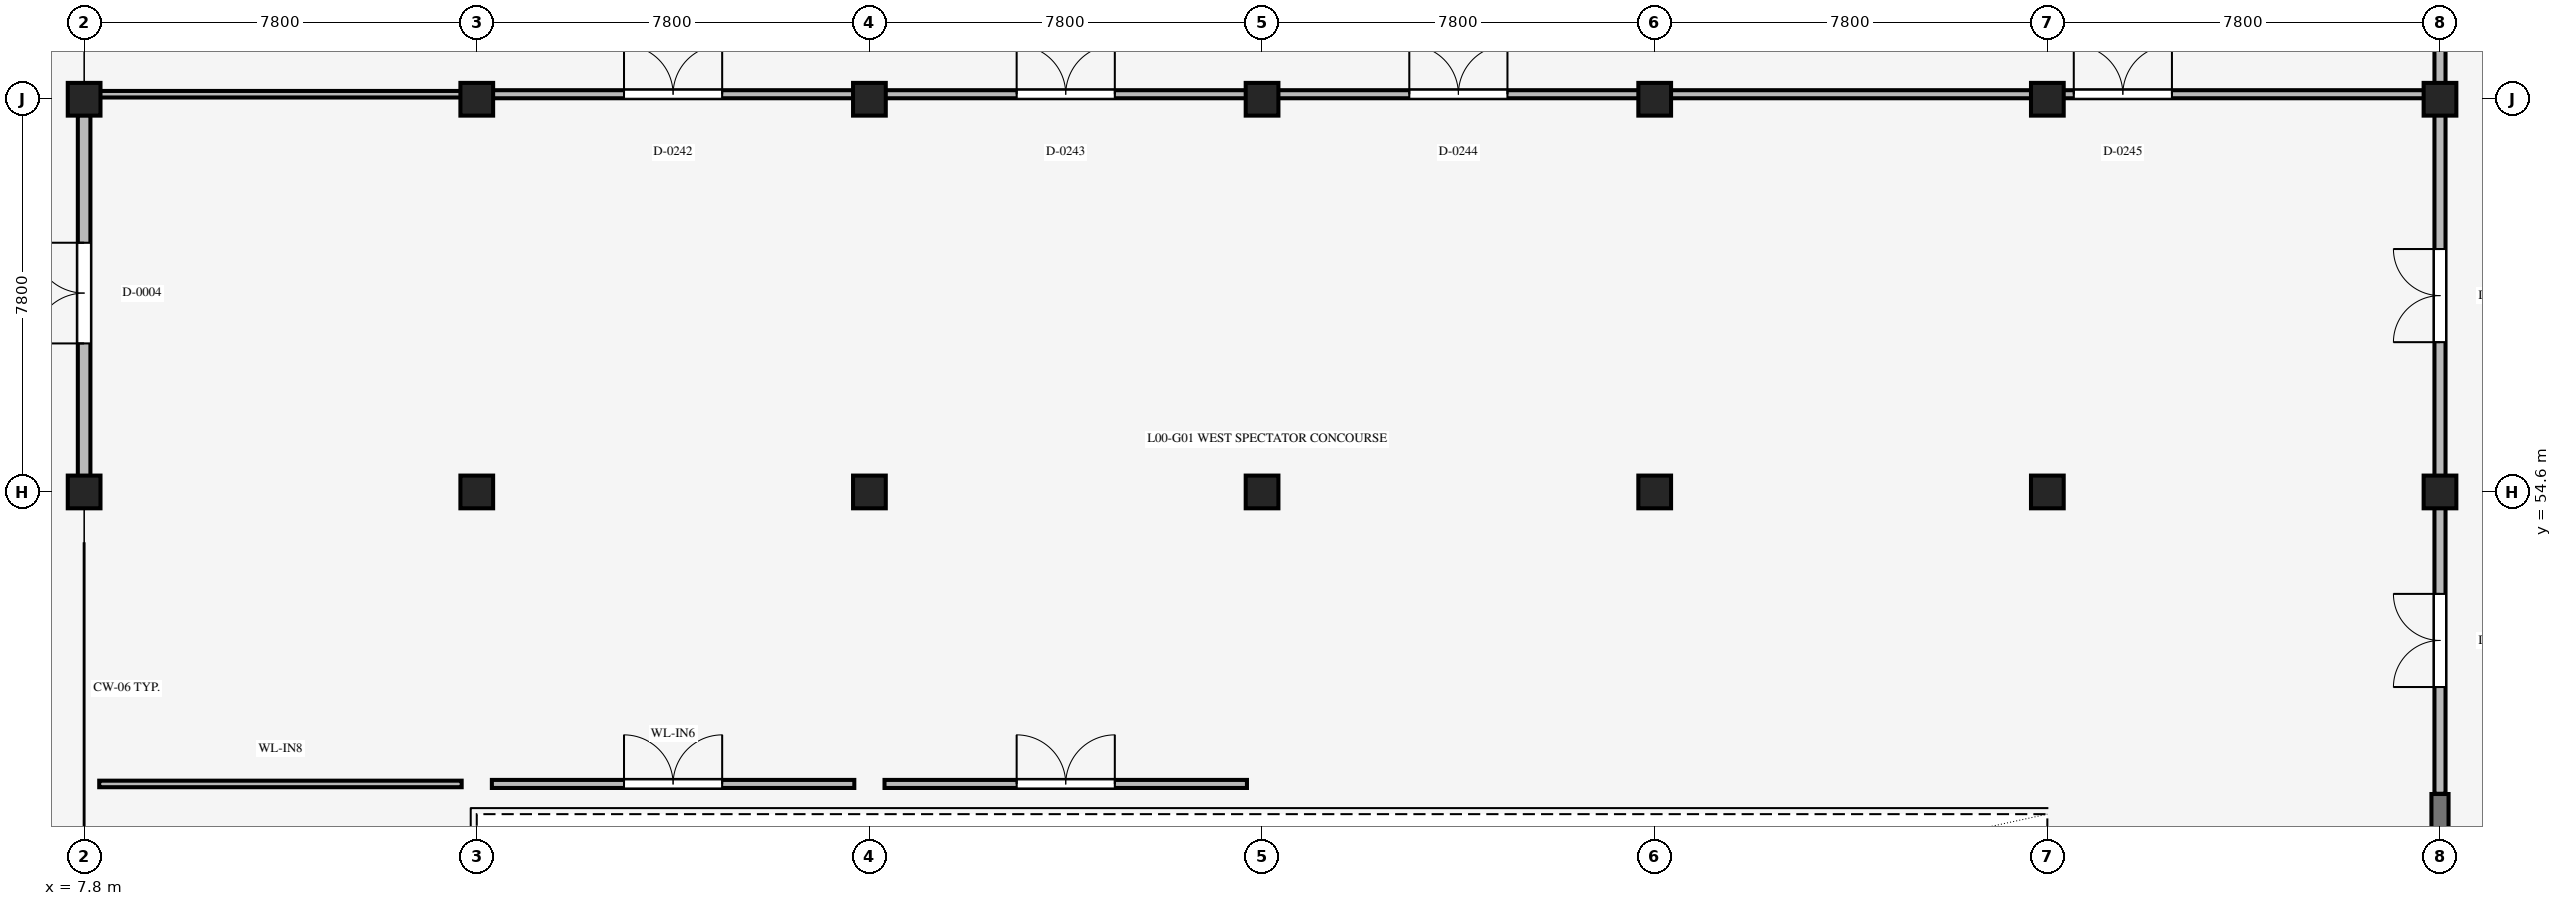
"""IFC4 building model, lengths in metres.
Left out: names, types, materials, properties, quantities, classifications, styles, units other than length and angle.
Written with IfcOpenShell. Run it as: python <this file> out.ifc"""

import sys

from ifc_helpers import new_model, si_unit, direction, frame, frame_2d, origin, origin_2d, place, context, subcontext, project, spatial, rectangle, extrude, element, fill, save


model = new_model("IFC4")
c1 = context("Model", 3, precision=1e-05, world=origin(), true_north=direction((0.0, 1.0)))
c2 = subcontext(c1, "Body", "Model", "MODEL_VIEW")
j1 = project(units=[si_unit("LENGTHUNIT", "METRE"), si_unit("PLANEANGLEUNIT", "RADIAN")], contexts=[c1])
p1 = place(None, origin())
s1 = spatial("IfcSite", under=j1, at=p1, CompositionType="ELEMENT")
p2 = place(p1, origin())
s2 = spatial("IfcBuilding", under=s1, at=p2, CompositionType="ELEMENT")
p3 = place(p2, origin())
s3 = spatial("IfcBuildingStorey", under=s2, at=p3, CompositionType="ELEMENT", Elevation=0.0)
for number, where, z_axis, x_axis in (
    (1, (7.8, 54.6, 0.0), (0.0, 0.0, 1.0), (1.0, 0.0, 0.0)),
    (2, (7.8, 62.4, 0.0), (0.0, 0.0, 1.0), (1.0, 0.0, 0.0)),
    (3, (15.6, 54.6, 0.0), (0.0, 0.0, 1.0), (1.0, 0.0, 0.0)),
    (4, (15.6, 62.4, 0.0), (0.0, 0.0, 1.0), (1.0, 0.0, 0.0)),
    (5, (23.4, 54.6, 0.0), (0.0, 0.0, 1.0), (1.0, 0.0, 0.0)),
    (6, (23.4, 62.4, 0.0), (0.0, 0.0, 1.0), (1.0, 0.0, 0.0)),
    (7, (31.2, 54.6, 0.0), (0.0, 0.0, 1.0), (1.0, 0.0, 0.0)),
    (8, (31.2, 62.4, 0.0), (0.0, 0.0, 1.0), (1.0, 0.0, 0.0)),
    (9, (39.0, 54.6, 0.0), (0.0, 0.0, 1.0), (1.0, 0.0, 0.0)),
    (10, (39.0, 62.4, 0.0), (0.0, 0.0, 1.0), (1.0, 0.0, 0.0)),
    (11, (46.8, 54.6, 0.0), (0.0, 0.0, 1.0), (1.0, 0.0, 0.0)),
    (12, (46.8, 62.4, 0.0), (0.0, 0.0, 1.0), (1.0, 0.0, 0.0)),
    (13, (54.6, 54.6, 0.0), (0.0, 0.0, 1.0), (1.0, 0.0, 0.0)),
    (14, (54.6, 62.4, 0.0), (0.0, 0.0, 1.0), (1.0, 0.0, 0.0)),
):
    element("IfcColumn", number, at=place(p3, frame(where, z_axis=z_axis, x_axis=x_axis)), inside=s3, PredefinedType="COLUMN", context=c2, shape_type="SweptSolid", body=[
        extrude(rectangle(XDim=0.65, YDim=0.65, at=origin_2d()), origin(), (0.0, 0.0, 1.0), 6.0),
    ])
p4 = place(p3, frame((7.8, 54.915, 0.0), z_axis=(0.0, 0.0, 1.0), x_axis=(0.0, 1.0, 0.0)))
e15 = element("IfcWall", 15, at=p4, inside=s3, PredefinedType="STANDARD", context=c2, shape_type="SweptSolid", body=[
    extrude(rectangle(XDim=7.17, YDim=0.25, at=frame_2d((3.585, 0.0))), origin(), (0.0, 0.0, 1.0), 4.691),
])
p5 = place(p4, frame((2.635, 0.0, 0.0)))
e16 = element("IfcOpeningElement", 16, at=p5, cuts=e15, PredefinedType="OPENING", context=c2, shape_type="SweptSolid", body=[
    extrude(rectangle(XDim=2.0, YDim=2.4, at=frame_2d((1.0, 1.2))), frame((0.0, 0.135, 0.0), z_axis=(0.0, -1.0, 0.0), x_axis=(1.0, 0.0, 0.0)), (0.0, 0.0, 1.0), 0.27),
])
p6 = place(p3, frame((54.6, 40.75, 0.0), z_axis=(0.0, 0.0, 1.0), x_axis=(0.0, 1.0, 0.0)))
e17 = element("IfcWall", 17, at=p6, inside=s3, PredefinedType="STANDARD", context=c2, shape_type="SweptSolid", body=[
    extrude(rectangle(XDim=7.85, YDim=0.34, at=frame_2d((3.925, 0.0))), origin(), (0.0, 0.0, 1.0), 4.9),
])
p7 = place(p6, frame((0.95, 0.0, 0.0)))
e18 = element("IfcOpeningElement", 18, at=p7, cuts=e17, PredefinedType="OPENING", context=c2, shape_type="SweptSolid", body=[
    extrude(rectangle(XDim=6.2, YDim=3.2, at=frame_2d((3.1, 1.6))), frame((0.0, 0.18, 0.0), z_axis=(0.0, -1.0, 0.0), x_axis=(1.0, 0.0, 0.0)), (0.0, 0.0, 1.0), 0.36),
])
p8 = place(p3, frame((8.1, 48.8, 0.0), z_axis=(0.0, 0.0, 1.0), x_axis=(1.0, 0.0, 0.0)))
e19 = element("IfcWall", 19, at=p8, inside=s3, PredefinedType="STANDARD", context=c2, shape_type="SweptSolid", body=[
    extrude(rectangle(XDim=7.2, YDim=0.13, at=frame_2d((3.6, 0.0))), origin(), (0.0, 0.0, 1.0), 3.05),
])
p9 = place(p3, frame((15.9, 48.8, 0.0), z_axis=(0.0, 0.0, 1.0), x_axis=(1.0, 0.0, 0.0)))
e20 = element("IfcWall", 20, at=p9, inside=s3, PredefinedType="STANDARD", context=c2, shape_type="SweptSolid", body=[
    extrude(rectangle(XDim=7.2, YDim=0.16, at=frame_2d((3.6, 0.0))), origin(), (0.0, 0.0, 1.0), 3.05),
])
p10 = place(p9, frame((2.625, 0.0, 0.0)))
e21 = element("IfcOpeningElement", 21, at=p10, cuts=e20, PredefinedType="OPENING", context=c2, shape_type="SweptSolid", body=[
    extrude(rectangle(XDim=1.95, YDim=2.35, at=frame_2d((0.975, 1.175))), frame((0.0, 0.09, 0.0), z_axis=(0.0, -1.0, 0.0), x_axis=(1.0, 0.0, 0.0)), (0.0, 0.0, 1.0), 0.18),
])
p11 = place(p3, frame((23.7, 48.8, 0.0), z_axis=(0.0, 0.0, 1.0), x_axis=(1.0, 0.0, 0.0)))
e22 = element("IfcWall", 22, at=p11, inside=s3, PredefinedType="STANDARD", context=c2, shape_type="SweptSolid", body=[
    extrude(rectangle(XDim=7.2, YDim=0.16, at=frame_2d((3.6, 0.0))), origin(), (0.0, 0.0, 1.0), 3.05),
])
p12 = place(p11, frame((2.625, 0.0, 0.0)))
e23 = element("IfcOpeningElement", 23, at=p12, cuts=e22, PredefinedType="OPENING", context=c2, shape_type="SweptSolid", body=[
    extrude(rectangle(XDim=1.95, YDim=2.35, at=frame_2d((0.975, 1.175))), frame((0.0, 0.09, 0.0), z_axis=(0.0, -1.0, 0.0), x_axis=(1.0, 0.0, 0.0)), (0.0, 0.0, 1.0), 0.18),
])
p13 = place(p3, frame((8.1, 62.5, 0.0), z_axis=(0.0, 0.0, 1.0), x_axis=(1.0, 0.0, 0.0)))
e24 = element("IfcWall", 24, at=p13, inside=s3, PredefinedType="STANDARD", context=c2, shape_type="SweptSolid", body=[
    extrude(rectangle(XDim=7.2, YDim=0.13, at=frame_2d((3.6, 0.0))), origin(), (0.0, 0.0, 1.0), 3.05),
])
p14 = place(p3, frame((15.9, 62.5, 0.0), z_axis=(0.0, 0.0, 1.0), x_axis=(1.0, 0.0, 0.0)))
e25 = element("IfcWall", 25, at=p14, inside=s3, PredefinedType="STANDARD", context=c2, shape_type="SweptSolid", body=[
    extrude(rectangle(XDim=7.2, YDim=0.16, at=frame_2d((3.6, 0.0))), origin(), (0.0, 0.0, 1.0), 3.05),
])
p15 = place(p14, frame((2.625, 0.0, 0.0)))
e26 = element("IfcOpeningElement", 26, at=p15, cuts=e25, PredefinedType="OPENING", context=c2, shape_type="SweptSolid", body=[
    extrude(rectangle(XDim=1.95, YDim=2.35, at=frame_2d((0.975, 1.175))), frame((0.0, 0.09, 0.0), z_axis=(0.0, -1.0, 0.0), x_axis=(1.0, 0.0, 0.0)), (0.0, 0.0, 1.0), 0.18),
])
p16 = place(p3, frame((23.7, 62.5, 0.0), z_axis=(0.0, 0.0, 1.0), x_axis=(1.0, 0.0, 0.0)))
e27 = element("IfcWall", 27, at=p16, inside=s3, PredefinedType="STANDARD", context=c2, shape_type="SweptSolid", body=[
    extrude(rectangle(XDim=7.2, YDim=0.16, at=frame_2d((3.6, 0.0))), origin(), (0.0, 0.0, 1.0), 3.05),
])
p17 = place(p16, frame((2.625, 0.0, 0.0)))
e28 = element("IfcOpeningElement", 28, at=p17, cuts=e27, PredefinedType="OPENING", context=c2, shape_type="SweptSolid", body=[
    extrude(rectangle(XDim=1.95, YDim=2.35, at=frame_2d((0.975, 1.175))), frame((0.0, 0.09, 0.0), z_axis=(0.0, -1.0, 0.0), x_axis=(1.0, 0.0, 0.0)), (0.0, 0.0, 1.0), 0.18),
])
p18 = place(p3, frame((31.5, 62.5, 0.0), z_axis=(0.0, 0.0, 1.0), x_axis=(1.0, 0.0, 0.0)))
e29 = element("IfcWall", 29, at=p18, inside=s3, PredefinedType="STANDARD", context=c2, shape_type="SweptSolid", body=[
    extrude(rectangle(XDim=7.2, YDim=0.16, at=frame_2d((3.6, 0.0))), origin(), (0.0, 0.0, 1.0), 3.05),
])
p19 = place(p18, frame((2.625, 0.0, 0.0)))
e30 = element("IfcOpeningElement", 30, at=p19, cuts=e29, PredefinedType="OPENING", context=c2, shape_type="SweptSolid", body=[
    extrude(rectangle(XDim=1.95, YDim=2.35, at=frame_2d((0.975, 1.175))), frame((0.0, 0.09, 0.0), z_axis=(0.0, -1.0, 0.0), x_axis=(1.0, 0.0, 0.0)), (0.0, 0.0, 1.0), 0.18),
])
p20 = place(p3, frame((39.3, 62.5, 0.0), z_axis=(0.0, 0.0, 1.0), x_axis=(1.0, 0.0, 0.0)))
e31 = element("IfcWall", 31, at=p20, inside=s3, PredefinedType="STANDARD", context=c2, shape_type="SweptSolid", body=[
    extrude(rectangle(XDim=15.0, YDim=0.16, at=frame_2d((7.5, 0.0))), origin(), (0.0, 0.0, 1.0), 3.05),
])
p21 = place(p20, frame((8.025, 0.0, 0.0)))
e32 = element("IfcOpeningElement", 32, at=p21, cuts=e31, PredefinedType="OPENING", context=c2, shape_type="SweptSolid", body=[
    extrude(rectangle(XDim=1.95, YDim=2.35, at=frame_2d((0.975, 1.175))), frame((0.0, 0.09, 0.0), z_axis=(0.0, -1.0, 0.0), x_axis=(1.0, 0.0, 0.0)), (0.0, 0.0, 1.0), 0.18),
])
p22 = place(p3, frame((54.6, 48.605, 0.0), z_axis=(0.0, 0.0, 1.0), x_axis=(0.0, 1.0, 0.0)))
e33 = element("IfcWall", 33, at=p22, inside=s3, PredefinedType="STANDARD", context=c2, shape_type="SweptSolid", body=[
    extrude(rectangle(XDim=5.695, YDim=0.22, at=frame_2d((2.848, 0.0))), origin(), (0.0, 0.0, 1.0), 3.05),
])
p23 = place(p22, frame((2.12, 0.0, 0.0)))
e34 = element("IfcOpeningElement", 34, at=p23, cuts=e33, PredefinedType="OPENING", context=c2, shape_type="SweptSolid", body=[
    extrude(rectangle(XDim=1.85, YDim=2.25, at=frame_2d((0.925, 1.125))), frame((0.0, 0.12, 0.0), z_axis=(0.0, -1.0, 0.0), x_axis=(1.0, 0.0, 0.0)), (0.0, 0.0, 1.0), 0.24),
])
p24 = place(p3, frame((54.6, 54.9, 0.0), z_axis=(0.0, 0.0, 1.0), x_axis=(0.0, 1.0, 0.0)))
e35 = element("IfcWall", 35, at=p24, inside=s3, PredefinedType="STANDARD", context=c2, shape_type="SweptSolid", body=[
    extrude(rectangle(XDim=7.2, YDim=0.22, at=frame_2d((3.6, 0.0))), origin(), (0.0, 0.0, 1.0), 3.05),
])
p25 = place(p24, frame((2.675, 0.0, 0.0)))
e36 = element("IfcOpeningElement", 36, at=p25, cuts=e35, PredefinedType="OPENING", context=c2, shape_type="SweptSolid", body=[
    extrude(rectangle(XDim=1.85, YDim=2.25, at=frame_2d((0.925, 1.125))), frame((0.0, 0.12, 0.0), z_axis=(0.0, -1.0, 0.0), x_axis=(1.0, 0.0, 0.0)), (0.0, 0.0, 1.0), 0.24),
])
p26 = place(p3, frame((54.6, 62.7, 0.0), z_axis=(0.0, 0.0, 1.0), x_axis=(0.0, 1.0, 0.0)))
e37 = element("IfcWall", 37, at=p26, inside=s3, PredefinedType="STANDARD", context=c2, shape_type="SweptSolid", body=[
    extrude(rectangle(XDim=5.4, YDim=0.22, at=frame_2d((2.7, 0.0))), origin(), (0.0, 0.0, 1.0), 3.05),
])
p27 = place(p26, frame((1.775, 0.0, 0.0)))
e38 = element("IfcOpeningElement", 38, at=p27, cuts=e37, PredefinedType="OPENING", context=c2, shape_type="SweptSolid", body=[
    extrude(rectangle(XDim=1.85, YDim=2.25, at=frame_2d((0.925, 1.125))), frame((0.0, 0.12, 0.0), z_axis=(0.0, -1.0, 0.0), x_axis=(1.0, 0.0, 0.0)), (0.0, 0.0, 1.0), 0.24),
])
p28 = place(p5, origin())
e39 = element("IfcDoor", 39, at=p28, inside=s3, OperationType="DOUBLE_DOOR_SINGLE_SWING", PredefinedType="DOOR", context=c2, shape_type="SweptSolid", body=[
    extrude(rectangle(XDim=2.0, YDim=2.4, at=frame_2d((1.0, 1.2))), frame((0.0, 0.025, 0.0), z_axis=(0.0, -1.0, 0.0), x_axis=(1.0, 0.0, 0.0)), (0.0, 0.0, 1.0), 0.05),
])
fill(e16, e39)
p29 = place(p10, origin())
e40 = element("IfcDoor", 40, at=p29, inside=s3, OperationType="DOUBLE_DOOR_SINGLE_SWING", PredefinedType="DOOR", context=c2, shape_type="SweptSolid", body=[
    extrude(rectangle(XDim=1.95, YDim=2.35, at=frame_2d((0.975, 1.175))), frame((0.0, 0.025, 0.0), z_axis=(0.0, -1.0, 0.0), x_axis=(1.0, 0.0, 0.0)), (0.0, 0.0, 1.0), 0.05),
])
fill(e21, e40)
p30 = place(p12, origin())
e41 = element("IfcDoor", 41, at=p30, inside=s3, OperationType="DOUBLE_DOOR_SINGLE_SWING", PredefinedType="DOOR", context=c2, shape_type="SweptSolid", body=[
    extrude(rectangle(XDim=1.95, YDim=2.35, at=frame_2d((0.975, 1.175))), frame((0.0, 0.025, 0.0), z_axis=(0.0, -1.0, 0.0), x_axis=(1.0, 0.0, 0.0)), (0.0, 0.0, 1.0), 0.05),
])
fill(e23, e41)
p31 = place(p15, origin())
e42 = element("IfcDoor", 42, at=p31, inside=s3, OperationType="DOUBLE_DOOR_SINGLE_SWING", PredefinedType="DOOR", context=c2, shape_type="SweptSolid", body=[
    extrude(rectangle(XDim=1.95, YDim=2.35, at=frame_2d((0.975, 1.175))), frame((0.0, 0.025, 0.0), z_axis=(0.0, -1.0, 0.0), x_axis=(1.0, 0.0, 0.0)), (0.0, 0.0, 1.0), 0.05),
])
fill(e26, e42)
p32 = place(p17, origin())
e43 = element("IfcDoor", 43, at=p32, inside=s3, OperationType="DOUBLE_DOOR_SINGLE_SWING", PredefinedType="DOOR", context=c2, shape_type="SweptSolid", body=[
    extrude(rectangle(XDim=1.95, YDim=2.35, at=frame_2d((0.975, 1.175))), frame((0.0, 0.025, 0.0), z_axis=(0.0, -1.0, 0.0), x_axis=(1.0, 0.0, 0.0)), (0.0, 0.0, 1.0), 0.05),
])
fill(e28, e43)
p33 = place(p19, origin())
e44 = element("IfcDoor", 44, at=p33, inside=s3, OperationType="DOUBLE_DOOR_SINGLE_SWING", PredefinedType="DOOR", context=c2, shape_type="SweptSolid", body=[
    extrude(rectangle(XDim=1.95, YDim=2.35, at=frame_2d((0.975, 1.175))), frame((0.0, 0.025, 0.0), z_axis=(0.0, -1.0, 0.0), x_axis=(1.0, 0.0, 0.0)), (0.0, 0.0, 1.0), 0.05),
])
fill(e30, e44)
p34 = place(p21, origin())
e45 = element("IfcDoor", 45, at=p34, inside=s3, OperationType="DOUBLE_DOOR_SINGLE_SWING", PredefinedType="DOOR", context=c2, shape_type="SweptSolid", body=[
    extrude(rectangle(XDim=1.95, YDim=2.35, at=frame_2d((0.975, 1.175))), frame((0.0, 0.025, 0.0), z_axis=(0.0, -1.0, 0.0), x_axis=(1.0, 0.0, 0.0)), (0.0, 0.0, 1.0), 0.05),
])
fill(e32, e45)
p35 = place(p23, origin())
e46 = element("IfcDoor", 46, at=p35, inside=s3, OperationType="DOUBLE_DOOR_SINGLE_SWING", PredefinedType="DOOR", context=c2, shape_type="SweptSolid", body=[
    extrude(rectangle(XDim=1.85, YDim=2.25, at=frame_2d((0.925, 1.125))), frame((0.0, 0.025, 0.0), z_axis=(0.0, -1.0, 0.0), x_axis=(1.0, 0.0, 0.0)), (0.0, 0.0, 1.0), 0.05),
])
fill(e34, e46)
p36 = place(p25, origin())
e47 = element("IfcDoor", 47, at=p36, inside=s3, OperationType="DOUBLE_DOOR_SINGLE_SWING", PredefinedType="DOOR", context=c2, shape_type="SweptSolid", body=[
    extrude(rectangle(XDim=1.85, YDim=2.25, at=frame_2d((0.925, 1.125))), frame((0.0, 0.025, 0.0), z_axis=(0.0, -1.0, 0.0), x_axis=(1.0, 0.0, 0.0)), (0.0, 0.0, 1.0), 0.05),
])
fill(e36, e47)
save(model, sys.argv[1])
